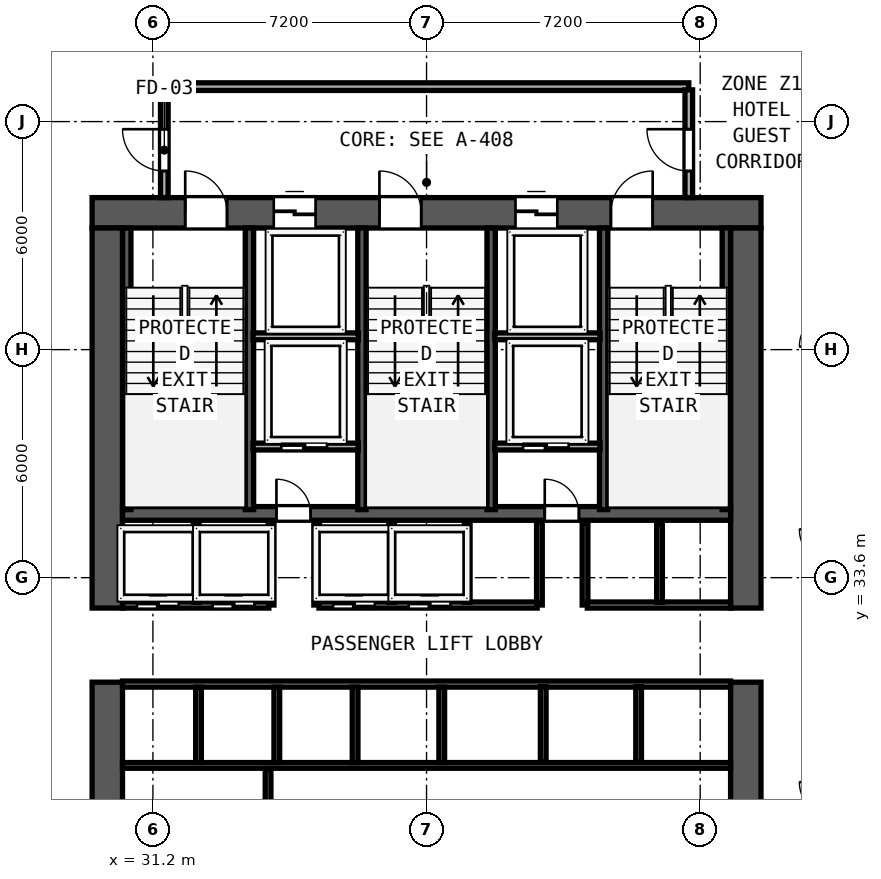
"""IFC4 building model, lengths in metres.
Left out: names, types, materials, properties, quantities, classifications, styles, units other than length and angle.
Written with IfcOpenShell. Run it as: python <this file> out.ifc"""

import sys

from ifc_helpers import new_model, si_unit, direction, frame, frame_2d, origin, place, context, subcontext, project, spatial, rectangle, extrude, element, fill, save


model = new_model("IFC4")
c1 = context("Model", 3, precision=1e-05, world=origin(), true_north=direction((0.0, 1.0)))
c2 = subcontext(c1, "Body", "Model", "MODEL_VIEW")
j1 = project(units=[si_unit("LENGTHUNIT", "METRE"), si_unit("PLANEANGLEUNIT", "RADIAN")], contexts=[c1])
p1 = place(None, origin())
s1 = spatial("IfcSite", under=j1, at=p1, CompositionType="ELEMENT")
p2 = place(p1, origin())
s2 = spatial("IfcBuilding", under=s1, at=p2, CompositionType="ELEMENT")
p3 = place(p2, frame((0.0, 0.0, 24.0)))
s3 = spatial("IfcBuildingStorey", under=s2, at=p3, CompositionType="ELEMENT", Elevation=24.0)
p4 = place(p3, frame((29.6, 43.2, 0.0), z_axis=(0.0, 0.0, 1.0), x_axis=(1.0, 0.0, 0.0)))
e1 = element("IfcWall", 1, at=p4, inside=s3, PredefinedType="SHEAR", context=c2, shape_type="SweptSolid", body=[
    extrude(rectangle(XDim=17.6, YDim=0.8, at=frame_2d((8.8, 0.0))), origin(), (0.0, 0.0, 1.0), 3.6),
])
p5 = place(p4, frame((2.45, 0.0, 0.0)))
e2 = element("IfcOpeningElement", 2, at=p5, cuts=e1, PredefinedType="OPENING", context=c2, shape_type="SweptSolid", body=[
    extrude(rectangle(XDim=1.1, YDim=2.15, at=frame_2d((0.55, 1.075))), frame((0.0, 0.41, 0.0), z_axis=(0.0, -1.0, 0.0), x_axis=(1.0, 0.0, 0.0)), (0.0, 0.0, 1.0), 0.82),
])
p6 = place(p4, frame((7.56, 0.0, 0.0)))
e3 = element("IfcOpeningElement", 3, at=p6, cuts=e1, PredefinedType="OPENING", context=c2, shape_type="SweptSolid", body=[
    extrude(rectangle(XDim=1.1, YDim=2.15, at=frame_2d((0.55, 1.075))), frame((0.0, 0.41, 0.0), z_axis=(0.0, -1.0, 0.0), x_axis=(1.0, 0.0, 0.0)), (0.0, 0.0, 1.0), 0.82),
])
p7 = place(p4, frame((13.65, 0.0, 0.0)))
e4 = element("IfcOpeningElement", 4, at=p7, cuts=e1, PredefinedType="OPENING", context=c2, shape_type="SweptSolid", body=[
    extrude(rectangle(XDim=1.1, YDim=2.15, at=frame_2d((0.55, 1.075))), frame((0.0, 0.41, 0.0), z_axis=(0.0, -1.0, 0.0), x_axis=(1.0, 0.0, 0.0)), (0.0, 0.0, 1.0), 0.82),
])
p8 = place(p4, frame((4.78, 0.0, 0.0)))
e5 = element("IfcOpeningElement", 5, at=p8, cuts=e1, PredefinedType="OPENING", context=c2, shape_type="SweptSolid", body=[
    extrude(rectangle(XDim=1.1, YDim=2.2, at=frame_2d((0.55, 1.1))), frame((0.0, 0.41, 0.0), z_axis=(0.0, -1.0, 0.0), x_axis=(1.0, 0.0, 0.0)), (0.0, 0.0, 1.0), 0.82),
])
p9 = place(p4, frame((11.14, 0.0, 0.0)))
e6 = element("IfcOpeningElement", 6, at=p9, cuts=e1, PredefinedType="OPENING", context=c2, shape_type="SweptSolid", body=[
    extrude(rectangle(XDim=1.1, YDim=2.2, at=frame_2d((0.55, 1.1))), frame((0.0, 0.41, 0.0), z_axis=(0.0, -1.0, 0.0), x_axis=(1.0, 0.0, 0.0)), (0.0, 0.0, 1.0), 0.82),
])
p10 = place(p3, frame((30.0, 26.8, 0.0), z_axis=(0.0, 0.0, 1.0), x_axis=(0.0, 1.0, 0.0)))
e7 = element("IfcWall", 7, at=p10, inside=s3, PredefinedType="SHEAR", context=c2, shape_type="SweptSolid", body=[
    extrude(rectangle(XDim=4.05, YDim=0.8, at=frame_2d((2.025, 0.0))), origin(), (0.0, 0.0, 1.0), 3.6),
])
p11 = place(p3, frame((30.0, 32.8, 0.0), z_axis=(0.0, 0.0, 1.0), x_axis=(0.0, 1.0, 0.0)))
e8 = element("IfcWall", 8, at=p11, inside=s3, PredefinedType="SHEAR", context=c2, shape_type="SweptSolid", body=[
    extrude(rectangle(XDim=10.0, YDim=0.8, at=frame_2d((5.0, 0.0))), origin(), (0.0, 0.0, 1.0), 3.6),
])
p12 = place(p3, frame((46.8, 26.8, 0.0), z_axis=(0.0, 0.0, 1.0), x_axis=(0.0, 1.0, 0.0)))
e9 = element("IfcWall", 9, at=p12, inside=s3, PredefinedType="SHEAR", context=c2, shape_type="SweptSolid", body=[
    extrude(rectangle(XDim=4.05, YDim=0.8, at=frame_2d((2.025, 0.0))), origin(), (0.0, 0.0, 1.0), 3.6),
])
p13 = place(p3, frame((46.8, 32.8, 0.0), z_axis=(0.0, 0.0, 1.0), x_axis=(0.0, 1.0, 0.0)))
e10 = element("IfcWall", 10, at=p13, inside=s3, PredefinedType="SHEAR", context=c2, shape_type="SweptSolid", body=[
    extrude(rectangle(XDim=10.0, YDim=0.8, at=frame_2d((5.0, 0.0))), origin(), (0.0, 0.0, 1.0), 3.6),
])
p14 = place(p3, frame((30.4, 35.29, 0.0), z_axis=(0.0, 0.0, 1.0), x_axis=(1.0, 0.0, 0.0)))
e11 = element("IfcWall", 11, at=p14, inside=s3, PredefinedType="SHEAR", context=c2, shape_type="SweptSolid", body=[
    extrude(rectangle(XDim=16.0, YDim=0.36, at=frame_2d((8.0, 0.0))), origin(), (0.0, 0.0, 1.0), 3.6),
])
p15 = place(p14, frame((4.95, 0.0, 0.0), z_axis=(0.0, 0.0, 1.0), x_axis=(-1.0, 0.0, 0.0)))
e12 = element("IfcOpeningElement", 12, at=p15, cuts=e11, PredefinedType="OPENING", context=c2, shape_type="SweptSolid", body=[
    extrude(rectangle(XDim=0.9, YDim=2.1, at=frame_2d((0.45, 1.05))), frame((0.0, 0.19, 0.0), z_axis=(0.0, -1.0, 0.0), x_axis=(1.0, 0.0, 0.0)), (0.0, 0.0, 1.0), 0.38),
])
p16 = place(p14, frame((12.01, 0.0, 0.0), z_axis=(0.0, 0.0, 1.0), x_axis=(-1.0, 0.0, 0.0)))
e13 = element("IfcOpeningElement", 13, at=p16, cuts=e11, PredefinedType="OPENING", context=c2, shape_type="SweptSolid", body=[
    extrude(rectangle(XDim=0.9, YDim=2.1, at=frame_2d((0.45, 1.05))), frame((0.0, 0.19, 0.0), z_axis=(0.0, -1.0, 0.0), x_axis=(1.0, 0.0, 0.0)), (0.0, 0.0, 1.0), 0.38),
])
for number, where, z_axis, x_axis in (
    (14, (30.512, 35.39, 0.0), (0.0, 0.0, 1.0), (0.0, 1.0, 0.0)),
    (15, (33.74, 35.39, 0.0), (0.0, 0.0, 1.0), (0.0, 1.0, 0.0)),
    (16, (36.7, 35.39, 0.0), (0.0, 0.0, 1.0), (0.0, 1.0, 0.0)),
    (17, (40.1, 35.39, 0.0), (0.0, 0.0, 1.0), (0.0, 1.0, 0.0)),
    (18, (43.06, 35.39, 0.0), (0.0, 0.0, 1.0), (0.0, 1.0, 0.0)),
    (19, (46.288, 35.39, 0.0), (0.0, 0.0, 1.0), (0.0, 1.0, 0.0)),
):
    element("IfcWall", number, at=place(p3, frame(where, z_axis=z_axis, x_axis=x_axis)), inside=s3, PredefinedType="SHEAR", context=c2, shape_type="SweptSolid", body=[
        extrude(rectangle(XDim=7.41, YDim=0.22, at=frame_2d((3.705, 0.0))), origin(), (0.0, 0.0, 1.0), 3.6),
    ])
p17 = place(p3, frame((31.5, 46.52, 0.0), z_axis=(0.0, 0.0, 1.0), x_axis=(1.0, 0.0, 0.0)))
e20 = element("IfcWall", 20, at=p17, inside=s3, PredefinedType="SOLIDWALL", context=c2, shape_type="SweptSolid", body=[
    extrude(rectangle(XDim=13.8, YDim=0.2, at=frame_2d((6.9, 0.0))), origin(), (0.0, 0.0, 1.0), 3.6),
])
p18 = place(p3, frame((31.5, 43.6, 0.0), z_axis=(0.0, 0.0, 1.0), x_axis=(0.0, 1.0, 0.0)))
e21 = element("IfcWall", 21, at=p18, inside=s3, PredefinedType="SOLIDWALL", context=c2, shape_type="SweptSolid", body=[
    extrude(rectangle(XDim=2.835, YDim=0.2, at=frame_2d((1.417, 0.0))), origin(), (0.0, 0.0, 1.0), 3.6),
])
p19 = place(p18, frame((1.8, 0.0, 0.0), z_axis=(0.0, 0.0, 1.0), x_axis=(-1.0, 0.0, 0.0)))
e22 = element("IfcOpeningElement", 22, at=p19, cuts=e21, PredefinedType="OPENING", context=c2, shape_type="SweptSolid", body=[
    extrude(rectangle(XDim=1.1, YDim=2.15, at=frame_2d((0.55, 1.075))), frame((0.0, 0.11, 0.0), z_axis=(0.0, -1.0, 0.0), x_axis=(1.0, 0.0, 0.0)), (0.0, 0.0, 1.0), 0.22),
])
p20 = place(p3, frame((45.3, 43.6, 0.0), z_axis=(0.0, 0.0, 1.0), x_axis=(0.0, 1.0, 0.0)))
e23 = element("IfcWall", 23, at=p20, inside=s3, PredefinedType="SOLIDWALL", context=c2, shape_type="SweptSolid", body=[
    extrude(rectangle(XDim=2.835, YDim=0.2, at=frame_2d((1.417, 0.0))), origin(), (0.0, 0.0, 1.0), 3.6),
])
p21 = place(p20, frame((0.7, 0.0, 0.0)))
e24 = element("IfcOpeningElement", 24, at=p21, cuts=e23, PredefinedType="OPENING", context=c2, shape_type="SweptSolid", body=[
    extrude(rectangle(XDim=1.1, YDim=2.15, at=frame_2d((0.55, 1.075))), frame((0.0, 0.11, 0.0), z_axis=(0.0, -1.0, 0.0), x_axis=(1.0, 0.0, 0.0)), (0.0, 0.0, 1.0), 0.22),
])
for number, where, z_axis, x_axis in (
    (25, (33.835, 39.95, 0.0), (0.0, 0.0, 1.0), (1.0, 0.0, 0.0)),
    (26, (40.195, 39.95, 0.0), (0.0, 0.0, 1.0), (1.0, 0.0, 0.0)),
):
    element("IfcWall", number, at=place(p3, frame(where, z_axis=z_axis, x_axis=x_axis)), inside=s3, PredefinedType="SOLIDWALL", context=c2, shape_type="SweptSolid", body=[
        extrude(rectangle(XDim=2.77, YDim=0.18, at=frame_2d((1.385, 0.0))), origin(), (0.0, 0.0, 1.0), 3.6),
    ])
p22 = place(p3, frame((33.835, 37.05, 0.0), z_axis=(0.0, 0.0, 1.0), x_axis=(1.0, 0.0, 0.0)))
e27 = element("IfcWall", 27, at=p22, inside=s3, PredefinedType="SOLIDWALL", context=c2, shape_type="SweptSolid", body=[
    extrude(rectangle(XDim=2.77, YDim=0.18, at=frame_2d((1.385, 0.0))), origin(), (0.0, 0.0, 1.0), 3.6),
])
p23 = place(p22, frame((1.945, 0.0, 0.0), z_axis=(0.0, 0.0, 1.0), x_axis=(-1.0, 0.0, 0.0)))
e28 = element("IfcOpeningElement", 28, at=p23, cuts=e27, PredefinedType="OPENING", context=c2, shape_type="SweptSolid", body=[
    extrude(rectangle(XDim=1.2, YDim=2.2, at=frame_2d((0.6, 1.1))), frame((0.0, 0.1, 0.0), z_axis=(0.0, -1.0, 0.0), x_axis=(1.0, 0.0, 0.0)), (0.0, 0.0, 1.0), 0.2),
])
for number, where, z_axis, x_axis in (
    (29, (34.31, 32.88, 0.0), (0.0, 0.0, 1.0), (0.0, 1.0, 0.0)),
    (30, (35.51, 32.88, 0.0), (0.0, 0.0, 1.0), (0.0, 1.0, 0.0)),
):
    element("IfcWall", number, at=place(p3, frame(where, z_axis=z_axis, x_axis=x_axis)), inside=s3, PredefinedType="SOLIDWALL", context=c2, shape_type="SweptSolid", body=[
        extrude(rectangle(XDim=2.17, YDim=0.15, at=frame_2d((1.085, 0.0))), origin(), (0.0, 0.0, 1.0), 3.6),
    ])
p24 = place(p3, frame((40.195, 37.05, 0.0), z_axis=(0.0, 0.0, 1.0), x_axis=(1.0, 0.0, 0.0)))
e31 = element("IfcWall", 31, at=p24, inside=s3, PredefinedType="SOLIDWALL", context=c2, shape_type="SweptSolid", body=[
    extrude(rectangle(XDim=2.77, YDim=0.18, at=frame_2d((1.385, 0.0))), origin(), (0.0, 0.0, 1.0), 3.6),
])
p25 = place(p24, frame((1.945, 0.0, 0.0), z_axis=(0.0, 0.0, 1.0), x_axis=(-1.0, 0.0, 0.0)))
e32 = element("IfcOpeningElement", 32, at=p25, cuts=e31, PredefinedType="OPENING", context=c2, shape_type="SweptSolid", body=[
    extrude(rectangle(XDim=1.2, YDim=2.2, at=frame_2d((0.6, 1.1))), frame((0.0, 0.1, 0.0), z_axis=(0.0, -1.0, 0.0), x_axis=(1.0, 0.0, 0.0)), (0.0, 0.0, 1.0), 0.2),
])
for number, where, z_axis, x_axis in (
    (33, (41.37, 32.88, 0.0), (0.0, 0.0, 1.0), (0.0, 1.0, 0.0)),
    (34, (42.57, 32.88, 0.0), (0.0, 0.0, 1.0), (0.0, 1.0, 0.0)),
):
    element("IfcWall", number, at=place(p3, frame(where, z_axis=z_axis, x_axis=x_axis)), inside=s3, PredefinedType="SOLIDWALL", context=c2, shape_type="SweptSolid", body=[
        extrude(rectangle(XDim=2.17, YDim=0.15, at=frame_2d((1.085, 0.0))), origin(), (0.0, 0.0, 1.0), 3.6),
    ])
p26 = place(p3, frame((30.4, 32.88, 0.0), z_axis=(0.0, 0.0, 1.0), x_axis=(1.0, 0.0, 0.0)))
e35 = element("IfcWall", 35, at=p26, inside=s3, PredefinedType="SOLIDWALL", context=c2, shape_type="SweptSolid", body=[
    extrude(rectangle(XDim=3.85, YDim=0.16, at=frame_2d((1.925, 0.0))), origin(), (0.0, 0.0, 1.0), 3.6),
])
p27 = place(p26, frame((1.48, 0.0, 0.0), z_axis=(0.0, 0.0, 1.0), x_axis=(-1.0, 0.0, 0.0)))
e36 = element("IfcOpeningElement", 36, at=p27, cuts=e35, PredefinedType="OPENING", context=c2, shape_type="SweptSolid", body=[
    extrude(rectangle(XDim=1.1, YDim=2.2, at=frame_2d((0.55, 1.1))), frame((0.0, 0.09, 0.0), z_axis=(0.0, -1.0, 0.0), x_axis=(1.0, 0.0, 0.0)), (0.0, 0.0, 1.0), 0.18),
])
p28 = place(p26, frame((3.47, 0.0, 0.0), z_axis=(0.0, 0.0, 1.0), x_axis=(-1.0, 0.0, 0.0)))
e37 = element("IfcOpeningElement", 37, at=p28, cuts=e35, PredefinedType="OPENING", context=c2, shape_type="SweptSolid", body=[
    extrude(rectangle(XDim=1.1, YDim=2.2, at=frame_2d((0.55, 1.1))), frame((0.0, 0.09, 0.0), z_axis=(0.0, -1.0, 0.0), x_axis=(1.0, 0.0, 0.0)), (0.0, 0.0, 1.0), 0.18),
])
p29 = place(p3, frame((35.57, 32.88, 0.0), z_axis=(0.0, 0.0, 1.0), x_axis=(1.0, 0.0, 0.0)))
e38 = element("IfcWall", 38, at=p29, inside=s3, PredefinedType="SOLIDWALL", context=c2, shape_type="SweptSolid", body=[
    extrude(rectangle(XDim=5.74, YDim=0.16, at=frame_2d((2.87, 0.0))), origin(), (0.0, 0.0, 1.0), 3.6),
])
p30 = place(p29, frame((1.47, 0.0, 0.0), z_axis=(0.0, 0.0, 1.0), x_axis=(-1.0, 0.0, 0.0)))
e39 = element("IfcOpeningElement", 39, at=p30, cuts=e38, PredefinedType="OPENING", context=c2, shape_type="SweptSolid", body=[
    extrude(rectangle(XDim=1.1, YDim=2.2, at=frame_2d((0.55, 1.1))), frame((0.0, 0.09, 0.0), z_axis=(0.0, -1.0, 0.0), x_axis=(1.0, 0.0, 0.0)), (0.0, 0.0, 1.0), 0.18),
])
p31 = place(p29, frame((3.46, 0.0, 0.0), z_axis=(0.0, 0.0, 1.0), x_axis=(-1.0, 0.0, 0.0)))
e40 = element("IfcOpeningElement", 40, at=p31, cuts=e38, PredefinedType="OPENING", context=c2, shape_type="SweptSolid", body=[
    extrude(rectangle(XDim=1.1, YDim=2.2, at=frame_2d((0.55, 1.1))), frame((0.0, 0.09, 0.0), z_axis=(0.0, -1.0, 0.0), x_axis=(1.0, 0.0, 0.0)), (0.0, 0.0, 1.0), 0.18),
])
p32 = place(p3, frame((42.63, 32.88, 0.0), z_axis=(0.0, 0.0, 1.0), x_axis=(1.0, 0.0, 0.0)))
e41 = element("IfcWall", 41, at=p32, inside=s3, PredefinedType="SOLIDWALL", context=c2, shape_type="SweptSolid", body=[
    extrude(rectangle(XDim=3.77, YDim=0.16, at=frame_2d((1.885, 0.0))), origin(), (0.0, 0.0, 1.0), 3.6),
])
for number, where, z_axis, x_axis in (
    (42, (32.34, 32.95, 0.0), (0.0, 0.0, 1.0), (0.0, 1.0, 0.0)),
    (43, (37.48, 32.95, 0.0), (0.0, 0.0, 1.0), (0.0, 1.0, 0.0)),
    (44, (39.47, 32.95, 0.0), (0.0, 0.0, 1.0), (0.0, 1.0, 0.0)),
    (45, (44.53, 32.95, 0.0), (0.0, 0.0, 1.0), (0.0, 1.0, 0.0)),
):
    element("IfcWall", number, at=place(p3, frame(where, z_axis=z_axis, x_axis=x_axis)), inside=s3, PredefinedType="SOLIDWALL", context=c2, shape_type="SweptSolid", body=[
        extrude(rectangle(XDim=2.05, YDim=0.15, at=frame_2d((1.025, 0.0))), origin(), (0.0, 0.0, 1.0), 3.6),
    ])
p33 = place(p3, frame((30.4, 30.8, 0.0), z_axis=(0.0, 0.0, 1.0), x_axis=(1.0, 0.0, 0.0)))
e46 = element("IfcWall", 46, at=p33, inside=s3, PredefinedType="SOLIDWALL", context=c2, shape_type="SweptSolid", body=[
    extrude(rectangle(XDim=16.0, YDim=0.16, at=frame_2d((8.0, 0.0))), origin(), (0.0, 0.0, 1.0), 3.6),
])
p34 = place(p3, frame((30.4, 28.66, 0.0), z_axis=(0.0, 0.0, 1.0), x_axis=(1.0, 0.0, 0.0)))
e47 = element("IfcWall", 47, at=p34, inside=s3, PredefinedType="PARTITIONING", context=c2, shape_type="SweptSolid", body=[
    extrude(rectangle(XDim=16.0, YDim=0.15, at=frame_2d((8.0, 0.0))), origin(), (0.0, 0.0, 1.0), 3.6),
])
for number, where, z_axis, x_axis in (
    (48, (32.4, 28.735, 0.0), (0.0, 0.0, 1.0), (0.0, 1.0, 0.0)),
    (49, (34.46, 28.735, 0.0), (0.0, 0.0, 1.0), (0.0, 1.0, 0.0)),
    (50, (36.52, 28.735, 0.0), (0.0, 0.0, 1.0), (0.0, 1.0, 0.0)),
    (51, (38.8, 28.735, 0.0), (0.0, 0.0, 1.0), (0.0, 1.0, 0.0)),
):
    element("IfcWall", number, at=place(p3, frame(where, z_axis=z_axis, x_axis=x_axis)), inside=s3, PredefinedType="SOLIDWALL", context=c2, shape_type="SweptSolid", body=[
        extrude(rectangle(XDim=1.985, YDim=0.15, at=frame_2d((0.992, 0.0))), origin(), (0.0, 0.0, 1.0), 3.6),
    ])
p35 = place(p3, frame((34.23, 26.81, 0.0), z_axis=(0.0, 0.0, 1.0), x_axis=(0.0, 1.0, 0.0)))
e52 = element("IfcWall", 52, at=p35, inside=s3, PredefinedType="PARTITIONING", context=c2, shape_type="SweptSolid", body=[
    extrude(rectangle(XDim=1.77, YDim=0.15, at=frame_2d((0.885, 0.0))), origin(), (0.0, 0.0, 1.0), 3.6),
])
for number, where, z_axis, x_axis in (
    (53, (41.47, 28.75, 0.0), (0.0, 0.0, 1.0), (0.0, 1.0, 0.0)),
    (54, (43.98, 28.75, 0.0), (0.0, 0.0, 1.0), (0.0, 1.0, 0.0)),
):
    element("IfcWall", number, at=place(p3, frame(where, z_axis=z_axis, x_axis=x_axis)), inside=s3, PredefinedType="SOLIDWALL", context=c2, shape_type="SweptSolid", body=[
        extrude(rectangle(XDim=1.985, YDim=0.15, at=frame_2d((0.993, 0.0))), origin(), (0.0, 0.0, 1.0), 3.6),
    ])
p36 = place(p5, origin())
e55 = element("IfcDoor", 55, at=p36, inside=s3, OperationType="SINGLE_SWING_LEFT", PredefinedType="DOOR", context=c2, shape_type="SweptSolid", body=[
    extrude(rectangle(XDim=1.1, YDim=2.15, at=frame_2d((0.55, 1.075))), frame((0.0, 0.185, 0.0), z_axis=(0.0, -1.0, 0.0), x_axis=(1.0, 0.0, 0.0)), (0.0, 0.0, 1.0), 0.05),
])
fill(e2, e55)
p37 = place(p6, origin())
e56 = element("IfcDoor", 56, at=p37, inside=s3, OperationType="SINGLE_SWING_LEFT", PredefinedType="DOOR", context=c2, shape_type="SweptSolid", body=[
    extrude(rectangle(XDim=1.1, YDim=2.15, at=frame_2d((0.55, 1.075))), frame((0.0, 0.185, 0.0), z_axis=(0.0, -1.0, 0.0), x_axis=(1.0, 0.0, 0.0)), (0.0, 0.0, 1.0), 0.05),
])
fill(e3, e56)
p38 = place(p7, origin())
e57 = element("IfcDoor", 57, at=p38, inside=s3, OperationType="SINGLE_SWING_RIGHT", PredefinedType="DOOR", context=c2, shape_type="SweptSolid", body=[
    extrude(rectangle(XDim=1.1, YDim=2.15, at=frame_2d((0.55, 1.075))), frame((0.0, 0.185, 0.0), z_axis=(0.0, -1.0, 0.0), x_axis=(1.0, 0.0, 0.0)), (0.0, 0.0, 1.0), 0.05),
])
fill(e4, e57)
p39 = place(p19, origin())
e58 = element("IfcDoor", 58, at=p39, inside=s3, OperationType="SINGLE_SWING_LEFT", PredefinedType="DOOR", context=c2, shape_type="SweptSolid", body=[
    extrude(rectangle(XDim=1.1, YDim=2.15, at=frame_2d((0.55, 1.075))), frame((0.0, 0.025, 0.0), z_axis=(0.0, -1.0, 0.0), x_axis=(1.0, 0.0, 0.0)), (0.0, 0.0, 1.0), 0.05),
])
fill(e22, e58)
p40 = place(p21, origin())
e59 = element("IfcDoor", 59, at=p40, inside=s3, OperationType="SINGLE_SWING_RIGHT", PredefinedType="DOOR", context=c2, shape_type="SweptSolid", body=[
    extrude(rectangle(XDim=1.1, YDim=2.15, at=frame_2d((0.55, 1.075))), frame((0.0, 0.025, 0.0), z_axis=(0.0, -1.0, 0.0), x_axis=(1.0, 0.0, 0.0)), (0.0, 0.0, 1.0), 0.05),
])
fill(e24, e59)
p41 = place(p8, origin())
e60 = element("IfcDoor", 60, at=p41, inside=s3, OperationType="SLIDING_TO_LEFT", PredefinedType="DOOR", context=c2, shape_type="SweptSolid", body=[
    extrude(rectangle(XDim=1.1, YDim=2.2, at=frame_2d((0.55, 1.1))), frame((0.0, 0.185, 0.0), z_axis=(0.0, -1.0, 0.0), x_axis=(1.0, 0.0, 0.0)), (0.0, 0.0, 1.0), 0.05),
])
fill(e5, e60)
p42 = place(p9, origin())
e61 = element("IfcDoor", 61, at=p42, inside=s3, OperationType="SLIDING_TO_LEFT", PredefinedType="DOOR", context=c2, shape_type="SweptSolid", body=[
    extrude(rectangle(XDim=1.1, YDim=2.2, at=frame_2d((0.55, 1.1))), frame((0.0, 0.185, 0.0), z_axis=(0.0, -1.0, 0.0), x_axis=(1.0, 0.0, 0.0)), (0.0, 0.0, 1.0), 0.05),
])
fill(e6, e61)
p43 = place(p23, origin())
e62 = element("IfcDoor", 62, at=p43, inside=s3, OperationType="SLIDING_TO_RIGHT", PredefinedType="DOOR", context=c2, shape_type="SweptSolid", body=[
    extrude(rectangle(XDim=1.2, YDim=2.2, at=frame_2d((0.6, 1.1))), frame((0.0, 0.025, 0.0), z_axis=(0.0, -1.0, 0.0), x_axis=(1.0, 0.0, 0.0)), (0.0, 0.0, 1.0), 0.05),
])
fill(e28, e62)
p44 = place(p15, origin())
e63 = element("IfcDoor", 63, at=p44, inside=s3, OperationType="SINGLE_SWING_RIGHT", PredefinedType="DOOR", context=c2, shape_type="SweptSolid", body=[
    extrude(rectangle(XDim=0.9, YDim=2.1, at=frame_2d((0.45, 1.05))), frame((0.0, 0.025, 0.0), z_axis=(0.0, -1.0, 0.0), x_axis=(1.0, 0.0, 0.0)), (0.0, 0.0, 1.0), 0.05),
])
fill(e12, e63)
p45 = place(p25, origin())
e64 = element("IfcDoor", 64, at=p45, inside=s3, OperationType="SLIDING_TO_RIGHT", PredefinedType="DOOR", context=c2, shape_type="SweptSolid", body=[
    extrude(rectangle(XDim=1.2, YDim=2.2, at=frame_2d((0.6, 1.1))), frame((0.0, 0.025, 0.0), z_axis=(0.0, -1.0, 0.0), x_axis=(1.0, 0.0, 0.0)), (0.0, 0.0, 1.0), 0.05),
])
fill(e32, e64)
p46 = place(p16, origin())
e65 = element("IfcDoor", 65, at=p46, inside=s3, OperationType="SINGLE_SWING_RIGHT", PredefinedType="DOOR", context=c2, shape_type="SweptSolid", body=[
    extrude(rectangle(XDim=0.9, YDim=2.1, at=frame_2d((0.45, 1.05))), frame((0.0, 0.025, 0.0), z_axis=(0.0, -1.0, 0.0), x_axis=(1.0, 0.0, 0.0)), (0.0, 0.0, 1.0), 0.05),
])
fill(e13, e65)
p47 = place(p27, origin())
e66 = element("IfcDoor", 66, at=p47, inside=s3, OperationType="SLIDING_TO_LEFT", PredefinedType="DOOR", context=c2, shape_type="SweptSolid", body=[
    extrude(rectangle(XDim=1.1, YDim=2.2, at=frame_2d((0.55, 1.1))), frame((0.0, 0.025, 0.0), z_axis=(0.0, -1.0, 0.0), x_axis=(1.0, 0.0, 0.0)), (0.0, 0.0, 1.0), 0.05),
])
fill(e36, e66)
p48 = place(p28, origin())
e67 = element("IfcDoor", 67, at=p48, inside=s3, OperationType="SLIDING_TO_LEFT", PredefinedType="DOOR", context=c2, shape_type="SweptSolid", body=[
    extrude(rectangle(XDim=1.1, YDim=2.2, at=frame_2d((0.55, 1.1))), frame((0.0, 0.025, 0.0), z_axis=(0.0, -1.0, 0.0), x_axis=(1.0, 0.0, 0.0)), (0.0, 0.0, 1.0), 0.05),
])
fill(e37, e67)
p49 = place(p30, origin())
e68 = element("IfcDoor", 68, at=p49, inside=s3, OperationType="SLIDING_TO_LEFT", PredefinedType="DOOR", context=c2, shape_type="SweptSolid", body=[
    extrude(rectangle(XDim=1.1, YDim=2.2, at=frame_2d((0.55, 1.1))), frame((0.0, 0.025, 0.0), z_axis=(0.0, -1.0, 0.0), x_axis=(1.0, 0.0, 0.0)), (0.0, 0.0, 1.0), 0.05),
])
fill(e39, e68)
p50 = place(p31, origin())
e69 = element("IfcDoor", 69, at=p50, inside=s3, OperationType="SLIDING_TO_LEFT", PredefinedType="DOOR", context=c2, shape_type="SweptSolid", body=[
    extrude(rectangle(XDim=1.1, YDim=2.2, at=frame_2d((0.55, 1.1))), frame((0.0, 0.025, 0.0), z_axis=(0.0, -1.0, 0.0), x_axis=(1.0, 0.0, 0.0)), (0.0, 0.0, 1.0), 0.05),
])
fill(e40, e69)
save(model, sys.argv[1])
